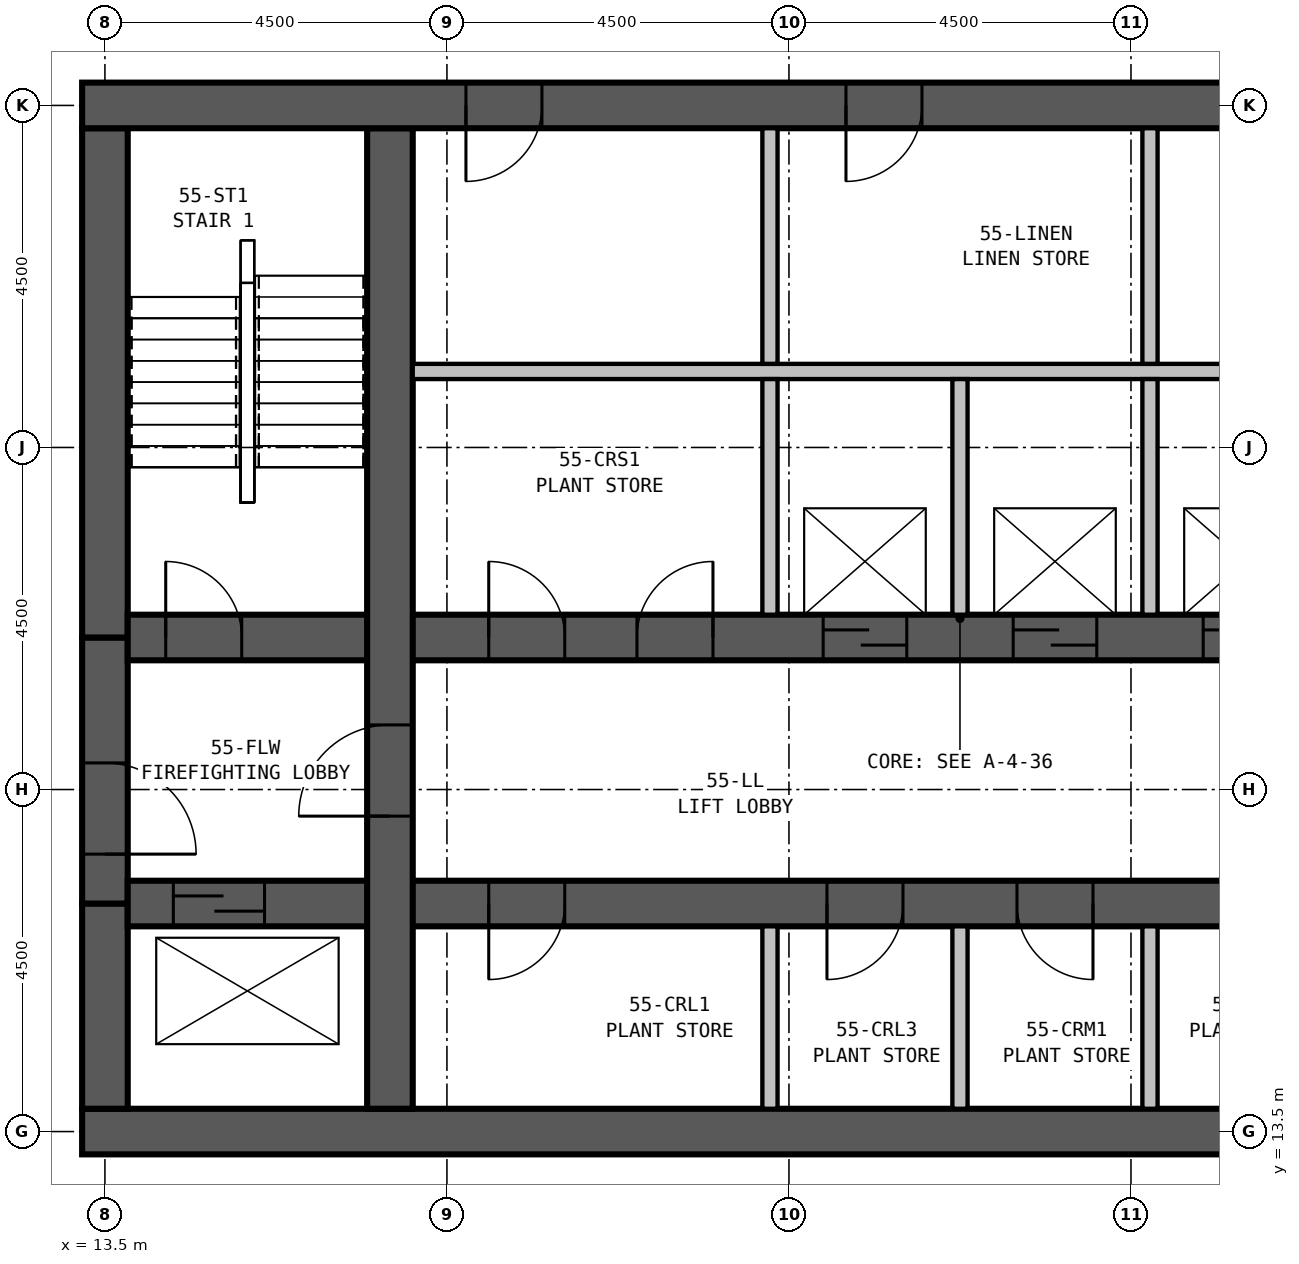
"""IFC4 building model, lengths in metres.
Left out: names, types, materials, properties, quantities, classifications, styles, units other than length and angle.
Written with IfcOpenShell. Run it as: python <this file> out.ifc"""

import sys

from ifc_helpers import new_model, si_unit, direction, frame, frame_2d, origin, place, context, subcontext, project, spatial, rectangle, extrude, element, fill, save


model = new_model("IFC4")
c1 = context("Model", 3, precision=1e-05, world=origin(), true_north=direction((0.0, 1.0)))
c2 = subcontext(c1, "Body", "Model", "MODEL_VIEW")
j1 = project(units=[si_unit("LENGTHUNIT", "METRE"), si_unit("PLANEANGLEUNIT", "RADIAN")], contexts=[c1])
p1 = place(None, origin())
s1 = spatial("IfcSite", under=j1, at=p1, CompositionType="ELEMENT")
p2 = place(p1, origin())
s2 = spatial("IfcBuilding", under=s1, at=p2, CompositionType="ELEMENT")
p3 = place(p2, frame((0.0, 0.0, 211.4)))
s3 = spatial("IfcBuildingStorey", under=s2, at=p3, CompositionType="ELEMENT", Elevation=211.4)
p4 = place(p3, frame((13.2, 13.5, 0.0), z_axis=(0.0, 0.0, 1.0), x_axis=(1.0, 0.0, 0.0)))
e1 = element("IfcWall", 1, at=p4, inside=s3, PredefinedType="SHEAR", context=c2, shape_type="SweptSolid", body=[
    extrude(rectangle(XDim=23.1, YDim=0.6, at=frame_2d((11.55, 0.0))), origin(), (0.0, 0.0, 1.0), 6.0),
])
p5 = place(p3, frame((36.3, 27.0, 0.0), z_axis=(0.0, 0.0, 1.0), x_axis=(-1.0, 0.0, 0.0)))
e2 = element("IfcWall", 2, at=p5, inside=s3, PredefinedType="SHEAR", context=c2, shape_type="SweptSolid", body=[
    extrude(rectangle(XDim=23.1, YDim=0.6, at=frame_2d((11.55, 0.0))), origin(), (0.0, 0.0, 1.0), 6.0),
])
p6 = place(p5, frame((17.05, 0.0, 0.0)))
e3 = element("IfcOpeningElement", 3, at=p6, cuts=e2, PredefinedType="OPENING", context=c2, shape_type="SweptSolid", body=[
    extrude(rectangle(XDim=1.0, YDim=2.1, at=frame_2d((0.5, 1.05))), frame((0.0, 0.31, 0.0), z_axis=(0.0, -1.0, 0.0), x_axis=(1.0, 0.0, 0.0)), (0.0, 0.0, 1.0), 0.62),
])
p7 = place(p5, frame((12.05, 0.0, 0.0)))
e4 = element("IfcOpeningElement", 4, at=p7, cuts=e2, PredefinedType="OPENING", context=c2, shape_type="SweptSolid", body=[
    extrude(rectangle(XDim=1.0, YDim=2.1, at=frame_2d((0.5, 1.05))), frame((0.0, 0.31, 0.0), z_axis=(0.0, -1.0, 0.0), x_axis=(1.0, 0.0, 0.0)), (0.0, 0.0, 1.0), 0.62),
])
p8 = place(p5, frame((7.05, 0.0, 0.0)))
e5 = element("IfcOpeningElement", 5, at=p8, cuts=e2, PredefinedType="OPENING", context=c2, shape_type="SweptSolid", body=[
    extrude(rectangle(XDim=1.0, YDim=2.1, at=frame_2d((0.5, 1.05))), frame((0.0, 0.31, 0.0), z_axis=(0.0, -1.0, 0.0), x_axis=(1.0, 0.0, 0.0)), (0.0, 0.0, 1.0), 0.62),
])
p9 = place(p3, frame((17.25, 13.8, 0.0), z_axis=(0.0, 0.0, 1.0), x_axis=(0.0, 1.0, 0.0)))
e6 = element("IfcWall", 6, at=p9, inside=s3, PredefinedType="SHEAR", context=c2, shape_type="SweptSolid", body=[
    extrude(rectangle(XDim=12.9, YDim=0.6, at=frame_2d((6.45, 0.0))), origin(), (0.0, 0.0, 1.0), 6.0),
])
p10 = place(p9, frame((3.85, 0.0, 0.0)))
e7 = element("IfcOpeningElement", 7, at=p10, cuts=e6, PredefinedType="OPENING", context=c2, shape_type="SweptSolid", body=[
    extrude(rectangle(XDim=1.2, YDim=2.1, at=frame_2d((0.6, 1.05))), frame((0.0, 0.31, 0.0), z_axis=(0.0, -1.0, 0.0), x_axis=(1.0, 0.0, 0.0)), (0.0, 0.0, 1.0), 0.62),
])
p11 = place(p3, frame((13.8, 16.5, 0.0), z_axis=(0.0, 0.0, 1.0), x_axis=(1.0, 0.0, 0.0)))
e8 = element("IfcWall", 8, at=p11, inside=s3, PredefinedType="SHEAR", context=c2, shape_type="SweptSolid", body=[
    extrude(rectangle(XDim=21.9, YDim=0.6, at=frame_2d((10.95, 0.0))), origin(), (0.0, 0.0, 1.0), 6.0),
])
p12 = place(p11, frame((5.75, 0.0, 0.0), z_axis=(0.0, 0.0, 1.0), x_axis=(-1.0, 0.0, 0.0)))
e9 = element("IfcOpeningElement", 9, at=p12, cuts=e8, PredefinedType="OPENING", context=c2, shape_type="SweptSolid", body=[
    extrude(rectangle(XDim=1.0, YDim=2.1, at=frame_2d((0.5, 1.05))), frame((0.0, 0.31, 0.0), z_axis=(0.0, -1.0, 0.0), x_axis=(1.0, 0.0, 0.0)), (0.0, 0.0, 1.0), 0.62),
])
p13 = place(p11, frame((10.2, 0.0, 0.0), z_axis=(0.0, 0.0, 1.0), x_axis=(-1.0, 0.0, 0.0)))
e10 = element("IfcOpeningElement", 10, at=p13, cuts=e8, PredefinedType="OPENING", context=c2, shape_type="SweptSolid", body=[
    extrude(rectangle(XDim=1.0, YDim=2.1, at=frame_2d((0.5, 1.05))), frame((0.0, 0.31, 0.0), z_axis=(0.0, -1.0, 0.0), x_axis=(1.0, 0.0, 0.0)), (0.0, 0.0, 1.0), 0.62),
])
p14 = place(p11, frame((12.7, 0.0, 0.0), z_axis=(0.0, 0.0, 1.0), x_axis=(-1.0, 0.0, 0.0)))
e11 = element("IfcOpeningElement", 11, at=p14, cuts=e8, PredefinedType="OPENING", context=c2, shape_type="SweptSolid", body=[
    extrude(rectangle(XDim=1.0, YDim=2.1, at=frame_2d((0.5, 1.05))), frame((0.0, 0.31, 0.0), z_axis=(0.0, -1.0, 0.0), x_axis=(1.0, 0.0, 0.0)), (0.0, 0.0, 1.0), 0.62),
])
p15 = place(p11, frame((17.15, 0.0, 0.0), z_axis=(0.0, 0.0, 1.0), x_axis=(-1.0, 0.0, 0.0)))
e12 = element("IfcOpeningElement", 12, at=p15, cuts=e8, PredefinedType="OPENING", context=c2, shape_type="SweptSolid", body=[
    extrude(rectangle(XDim=1.0, YDim=2.1, at=frame_2d((0.5, 1.05))), frame((0.0, 0.31, 0.0), z_axis=(0.0, -1.0, 0.0), x_axis=(1.0, 0.0, 0.0)), (0.0, 0.0, 1.0), 0.62),
])
p16 = place(p11, frame((0.6, 0.0, 0.0)))
e13 = element("IfcOpeningElement", 13, at=p16, cuts=e8, PredefinedType="OPENING", context=c2, shape_type="SweptSolid", body=[
    extrude(rectangle(XDim=1.2, YDim=2.1, at=frame_2d((0.6, 1.05))), frame((0.0, 0.31, 0.0), z_axis=(0.0, -1.0, 0.0), x_axis=(1.0, 0.0, 0.0)), (0.0, 0.0, 1.0), 0.62),
])
p17 = place(p11, frame((19.6, 0.0, 0.0)))
e14 = element("IfcOpeningElement", 14, at=p17, cuts=e8, PredefinedType="OPENING", context=c2, shape_type="SweptSolid", body=[
    extrude(rectangle(XDim=1.2, YDim=2.1, at=frame_2d((0.6, 1.05))), frame((0.0, 0.31, 0.0), z_axis=(0.0, -1.0, 0.0), x_axis=(1.0, 0.0, 0.0)), (0.0, 0.0, 1.0), 0.62),
])
p18 = place(p3, frame((13.8, 20.0, 0.0), z_axis=(0.0, 0.0, 1.0), x_axis=(1.0, 0.0, 0.0)))
e15 = element("IfcWall", 15, at=p18, inside=s3, PredefinedType="SHEAR", context=c2, shape_type="SweptSolid", body=[
    extrude(rectangle(XDim=21.9, YDim=0.6, at=frame_2d((10.95, 0.0))), origin(), (0.0, 0.0, 1.0), 6.0),
])
p19 = place(p18, frame((0.5, 0.0, 0.0)))
e16 = element("IfcOpeningElement", 16, at=p19, cuts=e15, PredefinedType="OPENING", context=c2, shape_type="SweptSolid", body=[
    extrude(rectangle(XDim=1.0, YDim=2.1, at=frame_2d((0.5, 1.05))), frame((0.0, 0.31, 0.0), z_axis=(0.0, -1.0, 0.0), x_axis=(1.0, 0.0, 0.0)), (0.0, 0.0, 1.0), 0.62),
])
p20 = place(p18, frame((20.5, 0.0, 0.0)))
e17 = element("IfcOpeningElement", 17, at=p20, cuts=e15, PredefinedType="OPENING", context=c2, shape_type="SweptSolid", body=[
    extrude(rectangle(XDim=1.0, YDim=2.1, at=frame_2d((0.5, 1.05))), frame((0.0, 0.31, 0.0), z_axis=(0.0, -1.0, 0.0), x_axis=(1.0, 0.0, 0.0)), (0.0, 0.0, 1.0), 0.62),
])
p21 = place(p18, frame((9.15, 0.0, 0.0)))
e18 = element("IfcOpeningElement", 18, at=p21, cuts=e15, PredefinedType="OPENING", context=c2, shape_type="SweptSolid", body=[
    extrude(rectangle(XDim=1.1, YDim=2.1, at=frame_2d((0.55, 1.05))), frame((0.0, 0.31, 0.0), z_axis=(0.0, -1.0, 0.0), x_axis=(1.0, 0.0, 0.0)), (0.0, 0.0, 1.0), 0.62),
])
p22 = place(p18, frame((11.65, 0.0, 0.0)))
e19 = element("IfcOpeningElement", 19, at=p22, cuts=e15, PredefinedType="OPENING", context=c2, shape_type="SweptSolid", body=[
    extrude(rectangle(XDim=1.1, YDim=2.1, at=frame_2d((0.55, 1.05))), frame((0.0, 0.31, 0.0), z_axis=(0.0, -1.0, 0.0), x_axis=(1.0, 0.0, 0.0)), (0.0, 0.0, 1.0), 0.62),
])
p23 = place(p18, frame((14.15, 0.0, 0.0)))
e20 = element("IfcOpeningElement", 20, at=p23, cuts=e15, PredefinedType="OPENING", context=c2, shape_type="SweptSolid", body=[
    extrude(rectangle(XDim=1.1, YDim=2.1, at=frame_2d((0.55, 1.05))), frame((0.0, 0.31, 0.0), z_axis=(0.0, -1.0, 0.0), x_axis=(1.0, 0.0, 0.0)), (0.0, 0.0, 1.0), 0.62),
])
p24 = place(p18, frame((16.65, 0.0, 0.0)))
e21 = element("IfcOpeningElement", 21, at=p24, cuts=e15, PredefinedType="OPENING", context=c2, shape_type="SweptSolid", body=[
    extrude(rectangle(XDim=1.1, YDim=2.1, at=frame_2d((0.55, 1.05))), frame((0.0, 0.31, 0.0), z_axis=(0.0, -1.0, 0.0), x_axis=(1.0, 0.0, 0.0)), (0.0, 0.0, 1.0), 0.62),
])
p25 = place(p18, frame((4.75, 0.0, 0.0)))
e22 = element("IfcOpeningElement", 22, at=p25, cuts=e15, PredefinedType="OPENING", context=c2, shape_type="SweptSolid", body=[
    extrude(rectangle(XDim=1.0, YDim=2.1, at=frame_2d((0.5, 1.05))), frame((0.0, 0.31, 0.0), z_axis=(0.0, -1.0, 0.0), x_axis=(1.0, 0.0, 0.0)), (0.0, 0.0, 1.0), 0.62),
])
p26 = place(p18, frame((6.7, 0.0, 0.0)))
e23 = element("IfcOpeningElement", 23, at=p26, cuts=e15, PredefinedType="OPENING", context=c2, shape_type="SweptSolid", body=[
    extrude(rectangle(XDim=1.0, YDim=2.1, at=frame_2d((0.5, 1.05))), frame((0.0, 0.31, 0.0), z_axis=(0.0, -1.0, 0.0), x_axis=(1.0, 0.0, 0.0)), (0.0, 0.0, 1.0), 0.62),
])
p27 = place(p3, frame((13.5, 26.7, 0.0), z_axis=(0.0, 0.0, 1.0), x_axis=(0.0, -1.0, 0.0)))
e24 = element("IfcWall", 24, at=p27, inside=s3, PredefinedType="SHEAR", context=c2, shape_type="SweptSolid", body=[
    extrude(rectangle(XDim=6.7, YDim=0.6, at=frame_2d((3.35, 0.0))), origin(), (0.0, 0.0, 1.0), 6.0),
])
p28 = place(p3, frame((13.5, 20.0, 0.0), z_axis=(0.0, 0.0, 1.0), x_axis=(0.0, -1.0, 0.0)))
e25 = element("IfcWall", 25, at=p28, inside=s3, PredefinedType="SHEAR", context=c2, shape_type="SweptSolid", body=[
    extrude(rectangle(XDim=3.5, YDim=0.6, at=frame_2d((1.75, 0.0))), origin(), (0.0, 0.0, 1.0), 6.0),
])
p29 = place(p28, frame((1.65, 0.0, 0.0)))
e26 = element("IfcOpeningElement", 26, at=p29, cuts=e25, PredefinedType="OPENING", context=c2, shape_type="SweptSolid", body=[
    extrude(rectangle(XDim=1.2, YDim=2.1, at=frame_2d((0.6, 1.05))), frame((0.0, 0.31, 0.0), z_axis=(0.0, -1.0, 0.0), x_axis=(1.0, 0.0, 0.0)), (0.0, 0.0, 1.0), 0.62),
])
p30 = place(p3, frame((13.5, 16.5, 0.0), z_axis=(0.0, 0.0, 1.0), x_axis=(0.0, -1.0, 0.0)))
e27 = element("IfcWall", 27, at=p30, inside=s3, PredefinedType="SHEAR", context=c2, shape_type="SweptSolid", body=[
    extrude(rectangle(XDim=2.7, YDim=0.6, at=frame_2d((1.35, 0.0))), origin(), (0.0, 0.0, 1.0), 6.0),
])
p31 = place(p3, frame((22.25, 13.8, 0.0), z_axis=(0.0, 0.0, 1.0), x_axis=(0.0, 1.0, 0.0)))
e28 = element("IfcWall", 28, at=p31, inside=s3, PredefinedType="PARTITIONING", context=c2, shape_type="SweptSolid", body=[
    extrude(rectangle(XDim=2.4, YDim=0.2, at=frame_2d((1.2, 0.0))), origin(), (0.0, 0.0, 1.0), 5.75),
])
p32 = place(p3, frame((22.25, 20.3, 0.0), z_axis=(0.0, 0.0, 1.0), x_axis=(0.0, 1.0, 0.0)))
e29 = element("IfcWall", 29, at=p32, inside=s3, PredefinedType="PARTITIONING", context=c2, shape_type="SweptSolid", body=[
    extrude(rectangle(XDim=3.1, YDim=0.2, at=frame_2d((1.55, 0.0))), origin(), (0.0, 0.0, 1.0), 5.75),
])
p33 = place(p3, frame((24.75, 13.8, 0.0), z_axis=(0.0, 0.0, 1.0), x_axis=(0.0, 1.0, 0.0)))
e30 = element("IfcWall", 30, at=p33, inside=s3, PredefinedType="PARTITIONING", context=c2, shape_type="SweptSolid", body=[
    extrude(rectangle(XDim=2.4, YDim=0.2, at=frame_2d((1.2, 0.0))), origin(), (0.0, 0.0, 1.0), 5.75),
])
p34 = place(p3, frame((24.75, 20.3, 0.0), z_axis=(0.0, 0.0, 1.0), x_axis=(0.0, 1.0, 0.0)))
e31 = element("IfcWall", 31, at=p34, inside=s3, PredefinedType="PARTITIONING", context=c2, shape_type="SweptSolid", body=[
    extrude(rectangle(XDim=3.1, YDim=0.2, at=frame_2d((1.55, 0.0))), origin(), (0.0, 0.0, 1.0), 5.75),
])
p35 = place(p3, frame((27.25, 13.8, 0.0), z_axis=(0.0, 0.0, 1.0), x_axis=(0.0, 1.0, 0.0)))
e32 = element("IfcWall", 32, at=p35, inside=s3, PredefinedType="PARTITIONING", context=c2, shape_type="SweptSolid", body=[
    extrude(rectangle(XDim=2.4, YDim=0.2, at=frame_2d((1.2, 0.0))), origin(), (0.0, 0.0, 1.0), 5.75),
])
p36 = place(p3, frame((27.25, 20.3, 0.0), z_axis=(0.0, 0.0, 1.0), x_axis=(0.0, 1.0, 0.0)))
e33 = element("IfcWall", 33, at=p36, inside=s3, PredefinedType="PARTITIONING", context=c2, shape_type="SweptSolid", body=[
    extrude(rectangle(XDim=3.1, YDim=0.2, at=frame_2d((1.55, 0.0))), origin(), (0.0, 0.0, 1.0), 5.75),
])
p37 = place(p3, frame((17.55, 23.5, 0.0), z_axis=(0.0, 0.0, 1.0), x_axis=(1.0, 0.0, 0.0)))
e34 = element("IfcWall", 34, at=p37, inside=s3, PredefinedType="PARTITIONING", context=c2, shape_type="SweptSolid", body=[
    extrude(rectangle(XDim=14.4, YDim=0.2, at=frame_2d((7.2, 0.0))), origin(), (0.0, 0.0, 1.0), 5.75),
])
for number, where, z_axis, x_axis in (
    (35, (22.25, 23.6, 0.0), (0.0, 0.0, 1.0), (0.0, 1.0, 0.0)),
    (36, (27.25, 23.6, 0.0), (0.0, 0.0, 1.0), (0.0, 1.0, 0.0)),
):
    element("IfcWall", number, at=place(p3, frame(where, z_axis=z_axis, x_axis=x_axis)), inside=s3, PredefinedType="PARTITIONING", context=c2, shape_type="SweptSolid", body=[
        extrude(rectangle(XDim=3.1, YDim=0.2, at=frame_2d((1.55, 0.0))), origin(), (0.0, 0.0, 1.0), 5.75),
    ])
p38 = place(p29, origin())
e37 = element("IfcDoor", 37, at=p38, inside=s3, OperationType="SINGLE_SWING_RIGHT", PredefinedType="DOOR", context=c2, shape_type="SweptSolid", body=[
    extrude(rectangle(XDim=1.2, YDim=2.1, at=frame_2d((0.6, 1.05))), frame((0.0, 0.3, 0.0), z_axis=(0.0, -1.0, 0.0), x_axis=(1.0, 0.0, 0.0)), (0.0, 0.0, 1.0), 0.6),
])
fill(e26, e37)
p39 = place(p10, origin())
e38 = element("IfcDoor", 38, at=p39, inside=s3, OperationType="SINGLE_SWING_LEFT", PredefinedType="DOOR", context=c2, shape_type="SweptSolid", body=[
    extrude(rectangle(XDim=1.2, YDim=2.1, at=frame_2d((0.6, 1.05))), frame((0.0, 0.3, 0.0), z_axis=(0.0, -1.0, 0.0), x_axis=(1.0, 0.0, 0.0)), (0.0, 0.0, 1.0), 0.6),
])
fill(e7, e38)
p40 = place(p19, origin())
e39 = element("IfcDoor", 39, at=p40, inside=s3, OperationType="SINGLE_SWING_LEFT", PredefinedType="DOOR", context=c2, shape_type="SweptSolid", body=[
    extrude(rectangle(XDim=1.0, YDim=2.1, at=frame_2d((0.5, 1.05))), frame((0.0, 0.3, 0.0), z_axis=(0.0, -1.0, 0.0), x_axis=(1.0, 0.0, 0.0)), (0.0, 0.0, 1.0), 0.6),
])
fill(e16, e39)
p41 = place(p21, origin())
e40 = element("IfcDoor", 40, at=p41, inside=s3, OperationType="SLIDING_TO_LEFT", PredefinedType="DOOR", context=c2, shape_type="SweptSolid", body=[
    extrude(rectangle(XDim=1.1, YDim=2.1, at=frame_2d((0.55, 1.05))), frame((0.0, 0.3, 0.0), z_axis=(0.0, -1.0, 0.0), x_axis=(1.0, 0.0, 0.0)), (0.0, 0.0, 1.0), 0.6),
])
fill(e18, e40)
p42 = place(p22, origin())
e41 = element("IfcDoor", 41, at=p42, inside=s3, OperationType="SLIDING_TO_LEFT", PredefinedType="DOOR", context=c2, shape_type="SweptSolid", body=[
    extrude(rectangle(XDim=1.1, YDim=2.1, at=frame_2d((0.55, 1.05))), frame((0.0, 0.3, 0.0), z_axis=(0.0, -1.0, 0.0), x_axis=(1.0, 0.0, 0.0)), (0.0, 0.0, 1.0), 0.6),
])
fill(e19, e41)
p43 = place(p23, origin())
e42 = element("IfcDoor", 42, at=p43, inside=s3, OperationType="SLIDING_TO_LEFT", PredefinedType="DOOR", context=c2, shape_type="SweptSolid", body=[
    extrude(rectangle(XDim=1.1, YDim=2.1, at=frame_2d((0.55, 1.05))), frame((0.0, 0.3, 0.0), z_axis=(0.0, -1.0, 0.0), x_axis=(1.0, 0.0, 0.0)), (0.0, 0.0, 1.0), 0.6),
])
fill(e20, e42)
p44 = place(p12, origin())
e43 = element("IfcDoor", 43, at=p44, inside=s3, OperationType="SINGLE_SWING_RIGHT", PredefinedType="DOOR", context=c2, shape_type="SweptSolid", body=[
    extrude(rectangle(XDim=1.0, YDim=2.1, at=frame_2d((0.5, 1.05))), frame((0.0, 0.3, 0.0), z_axis=(0.0, -1.0, 0.0), x_axis=(1.0, 0.0, 0.0)), (0.0, 0.0, 1.0), 0.6),
])
fill(e9, e43)
p45 = place(p13, origin())
e44 = element("IfcDoor", 44, at=p45, inside=s3, OperationType="SINGLE_SWING_RIGHT", PredefinedType="DOOR", context=c2, shape_type="SweptSolid", body=[
    extrude(rectangle(XDim=1.0, YDim=2.1, at=frame_2d((0.5, 1.05))), frame((0.0, 0.3, 0.0), z_axis=(0.0, -1.0, 0.0), x_axis=(1.0, 0.0, 0.0)), (0.0, 0.0, 1.0), 0.6),
])
fill(e10, e44)
p46 = place(p14, origin())
e45 = element("IfcDoor", 45, at=p46, inside=s3, OperationType="SINGLE_SWING_LEFT", PredefinedType="DOOR", context=c2, shape_type="SweptSolid", body=[
    extrude(rectangle(XDim=1.0, YDim=2.1, at=frame_2d((0.5, 1.05))), frame((0.0, 0.3, 0.0), z_axis=(0.0, -1.0, 0.0), x_axis=(1.0, 0.0, 0.0)), (0.0, 0.0, 1.0), 0.6),
])
fill(e11, e45)
p47 = place(p25, origin())
e46 = element("IfcDoor", 46, at=p47, inside=s3, OperationType="SINGLE_SWING_LEFT", PredefinedType="DOOR", context=c2, shape_type="SweptSolid", body=[
    extrude(rectangle(XDim=1.0, YDim=2.1, at=frame_2d((0.5, 1.05))), frame((0.0, 0.3, 0.0), z_axis=(0.0, -1.0, 0.0), x_axis=(1.0, 0.0, 0.0)), (0.0, 0.0, 1.0), 0.6),
])
fill(e22, e46)
p48 = place(p26, origin())
e47 = element("IfcDoor", 47, at=p48, inside=s3, OperationType="SINGLE_SWING_RIGHT", PredefinedType="DOOR", context=c2, shape_type="SweptSolid", body=[
    extrude(rectangle(XDim=1.0, YDim=2.1, at=frame_2d((0.5, 1.05))), frame((0.0, 0.3, 0.0), z_axis=(0.0, -1.0, 0.0), x_axis=(1.0, 0.0, 0.0)), (0.0, 0.0, 1.0), 0.6),
])
fill(e23, e47)
p49 = place(p16, origin())
e48 = element("IfcDoor", 48, at=p49, inside=s3, OperationType="SLIDING_TO_LEFT", PredefinedType="DOOR", context=c2, shape_type="SweptSolid", body=[
    extrude(rectangle(XDim=1.2, YDim=2.1, at=frame_2d((0.6, 1.05))), frame((0.0, 0.3, 0.0), z_axis=(0.0, -1.0, 0.0), x_axis=(1.0, 0.0, 0.0)), (0.0, 0.0, 1.0), 0.6),
])
fill(e13, e48)
p50 = place(p6, origin())
e49 = element("IfcDoor", 49, at=p50, inside=s3, OperationType="SINGLE_SWING_RIGHT", PredefinedType="DOOR", context=c2, shape_type="SweptSolid", body=[
    extrude(rectangle(XDim=1.0, YDim=2.1, at=frame_2d((0.5, 1.05))), frame((0.0, 0.3, 0.0), z_axis=(0.0, -1.0, 0.0), x_axis=(1.0, 0.0, 0.0)), (0.0, 0.0, 1.0), 0.6),
])
fill(e3, e49)
p51 = place(p7, origin())
e50 = element("IfcDoor", 50, at=p51, inside=s3, OperationType="SINGLE_SWING_RIGHT", PredefinedType="DOOR", context=c2, shape_type="SweptSolid", body=[
    extrude(rectangle(XDim=1.0, YDim=2.1, at=frame_2d((0.5, 1.05))), frame((0.0, 0.3, 0.0), z_axis=(0.0, -1.0, 0.0), x_axis=(1.0, 0.0, 0.0)), (0.0, 0.0, 1.0), 0.6),
])
fill(e4, e50)
save(model, sys.argv[1])
